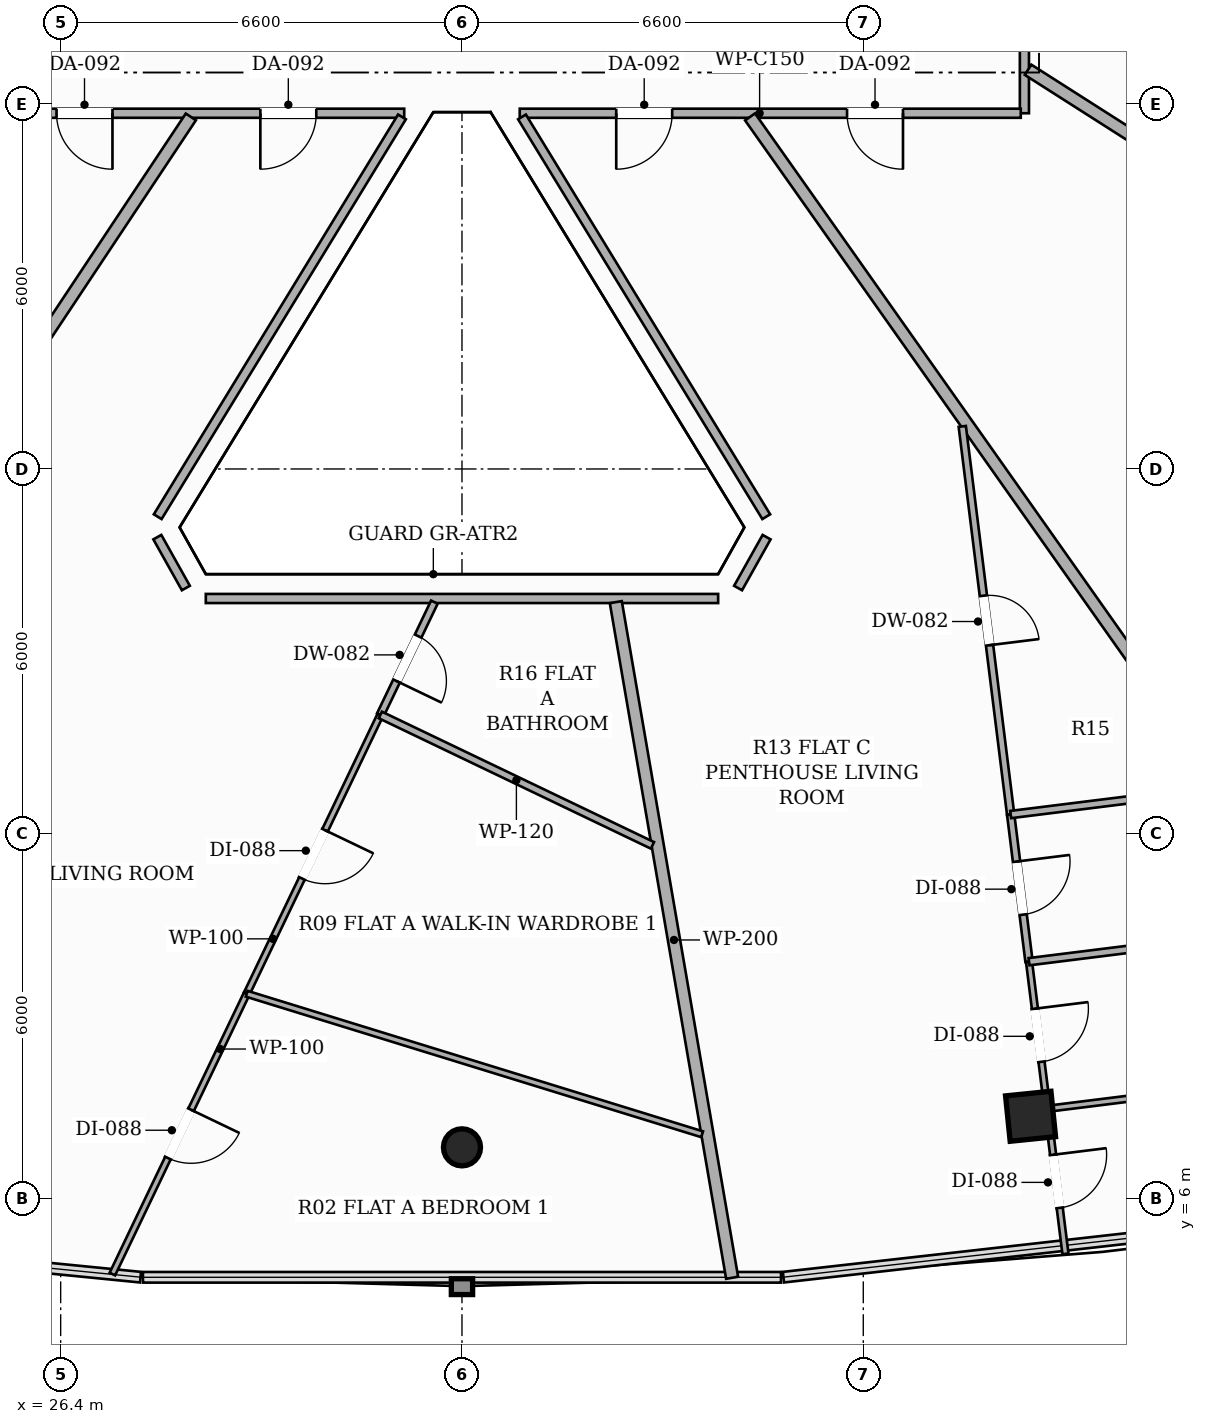
"""IFC4 building model, lengths in metres.
Left out: names, types, materials, properties, quantities, classifications, styles, units other than length and angle.
Written with IfcOpenShell. Run it as: python <this file> out.ifc"""

import sys

from ifc_helpers import new_model, si_unit, direction, frame, frame_2d, origin, origin_2d, place, context, subcontext, project, spatial, rectangle, hollow_rectangle, hollow_circle, extrude, element, fill, save


model = new_model("IFC4")
c1 = context("Model", 3, precision=1e-05, world=origin(), true_north=direction((0.0, 1.0)))
c2 = subcontext(c1, "Body", "Model", "MODEL_VIEW")
j1 = project(units=[si_unit("LENGTHUNIT", "METRE"), si_unit("PLANEANGLEUNIT", "RADIAN")], contexts=[c1])
p1 = place(None, origin())
s1 = spatial("IfcSite", under=j1, at=p1, CompositionType="ELEMENT")
p2 = place(p1, origin())
s2 = spatial("IfcBuilding", under=s1, at=p2, CompositionType="ELEMENT")
p3 = place(p2, frame((0.0, 0.0, 206.3)))
s3 = spatial("IfcBuildingStorey", under=s2, at=p3, CompositionType="ELEMENT", Elevation=206.3)
p4 = place(p3, frame((33.0, 6.844, 0.0), z_axis=(0.0, 0.0, 1.0), x_axis=(1.0, 0.0, 0.0)))
e1 = element("IfcColumn", 1, at=p4, inside=s3, PredefinedType="COLUMN", context=c2, shape_type="SweptSolid", body=[
    extrude(hollow_circle(Radius=0.305, WallThickness=0.016, at=origin_2d()), origin(), (0.0, 0.0, 1.0), 3.3),
])
p5 = place(p3, frame((42.351, 7.355, 0.0), z_axis=(0.0, 0.0, 1.0), x_axis=(0.994880708829, 0.101056297183, 0.0)))
e2 = element("IfcColumn", 2, at=p5, inside=s3, PredefinedType="COLUMN", context=c2, shape_type="SweptSolid", body=[
    extrude(hollow_rectangle(XDim=0.75, YDim=0.75, WallThickness=0.025, at=origin_2d()), origin(), (0.0, 0.0, 1.0), 3.3),
])
p6 = place(p3, frame((32.05, 23.85, 0.0), z_axis=(0.0, 0.0, 1.0), x_axis=(-1.0, 0.0, 0.0)))
e3 = element("IfcWall", 3, at=p6, inside=s3, PredefinedType="PARTITIONING", context=c2, shape_type="SweptSolid", body=[
    extrude(rectangle(XDim=8.4, YDim=0.15, at=frame_2d((4.2, 0.0))), origin(), (0.0, 0.0, 1.0), 2.565),
])
p7 = place(p6, frame((1.446, 0.0, 0.0)))
e4 = element("IfcOpeningElement", 4, at=p7, cuts=e3, PredefinedType="OPENING", context=c2, shape_type="SweptSolid", body=[
    extrude(rectangle(XDim=0.92, YDim=2.15, at=frame_2d((0.46, 1.075))), frame((0.0, 0.085, 0.0), z_axis=(0.0, -1.0, 0.0), x_axis=(1.0, 0.0, 0.0)), (0.0, 0.0, 1.0), 0.17),
])
p8 = place(p6, frame((4.798, 0.0, 0.0)))
e5 = element("IfcOpeningElement", 5, at=p8, cuts=e3, PredefinedType="OPENING", context=c2, shape_type="SweptSolid", body=[
    extrude(rectangle(XDim=0.92, YDim=2.15, at=frame_2d((0.46, 1.075))), frame((0.0, 0.085, 0.0), z_axis=(0.0, -1.0, 0.0), x_axis=(1.0, 0.0, 0.0)), (0.0, 0.0, 1.0), 0.17),
])
p9 = place(p3, frame((42.25, 26.59, 0.0), z_axis=(0.0, 0.0, 1.0), x_axis=(0.0, -1.0, 0.0)))
e6 = element("IfcWall", 6, at=p9, inside=s3, PredefinedType="PARTITIONING", context=c2, shape_type="SweptSolid", body=[
    extrude(rectangle(XDim=2.74, YDim=0.15, at=frame_2d((1.37, 0.0))), origin(), (0.0, 0.0, 1.0), 2.773),
])
p10 = place(p3, frame((42.19, 23.85, 0.0), z_axis=(0.0, 0.0, 1.0), x_axis=(-1.0, 0.0, 0.0)))
e7 = element("IfcWall", 7, at=p10, inside=s3, PredefinedType="PARTITIONING", context=c2, shape_type="SweptSolid", body=[
    extrude(rectangle(XDim=8.24, YDim=0.15, at=frame_2d((4.12, 0.0))), origin(), (0.0, 0.0, 1.0), 2.565),
])
p11 = place(p10, frame((1.937, 0.0, 0.0)))
e8 = element("IfcOpeningElement", 8, at=p11, cuts=e7, PredefinedType="OPENING", context=c2, shape_type="SweptSolid", body=[
    extrude(rectangle(XDim=0.92, YDim=2.15, at=frame_2d((0.46, 1.075))), frame((0.0, 0.085, 0.0), z_axis=(0.0, -1.0, 0.0), x_axis=(1.0, 0.0, 0.0)), (0.0, 0.0, 1.0), 0.17),
])
p12 = place(p10, frame((5.733, 0.0, 0.0)))
e9 = element("IfcOpeningElement", 9, at=p12, cuts=e7, PredefinedType="OPENING", context=c2, shape_type="SweptSolid", body=[
    extrude(rectangle(XDim=0.92, YDim=2.15, at=frame_2d((0.46, 1.075))), frame((0.0, 0.085, 0.0), z_axis=(0.0, -1.0, 0.0), x_axis=(1.0, 0.0, 0.0)), (0.0, 0.0, 1.0), 0.17),
])
p13 = place(p3, frame((33.987, 23.79, 0.0), z_axis=(0.0, 0.0, 1.0), x_axis=(0.521338496894, -0.853349970209, 0.0)))
e10 = element("IfcWall", 10, at=p13, inside=s3, PredefinedType="PARTITIONING", context=c2, shape_type="SweptSolid", body=[
    extrude(rectangle(XDim=7.705, YDim=0.15, at=frame_2d((3.853, 0.0))), origin(), (0.0, 0.0, 1.0), 2.773),
])
p14 = place(p3, frame((38.01, 16.879, 0.0), z_axis=(0.0, 0.0, 1.0), x_axis=(-0.488859069364, -0.872362774481, 0.0)))
e11 = element("IfcWall", 11, at=p14, inside=s3, PredefinedType="PARTITIONING", context=c2, shape_type="SweptSolid", body=[
    extrude(rectangle(XDim=0.959, YDim=0.15, at=frame_2d((0.48, 0.0))), origin(), (0.0, 0.0, 1.0), 3.06),
])
p15 = place(p3, frame((37.213, 15.87, 0.0), z_axis=(0.0, 0.0, 1.0), x_axis=(-1.0, 0.0, 0.0)))
e12 = element("IfcWall", 12, at=p15, inside=s3, PredefinedType="PARTITIONING", context=c2, shape_type="SweptSolid", body=[
    extrude(rectangle(XDim=8.426, YDim=0.15, at=frame_2d((4.213, 0.0))), origin(), (0.0, 0.0, 1.0), 2.773),
])
p16 = place(p3, frame((28.459, 16.042, 0.0), z_axis=(0.0, 0.0, 1.0), x_axis=(-0.488859069364, 0.872362774481, 0.0)))
e13 = element("IfcWall", 13, at=p16, inside=s3, PredefinedType="PARTITIONING", context=c2, shape_type="SweptSolid", body=[
    extrude(rectangle(XDim=0.959, YDim=0.15, at=frame_2d((0.48, 0.0))), origin(), (0.0, 0.0, 1.0), 3.06),
])
p17 = place(p3, frame((27.996, 17.215, 0.0), z_axis=(0.0, 0.0, 1.0), x_axis=(0.521338496894, 0.853349970209, 0.0)))
e14 = element("IfcWall", 14, at=p17, inside=s3, PredefinedType="PARTITIONING", context=c2, shape_type="SweptSolid", body=[
    extrude(rectangle(XDim=7.705, YDim=0.15, at=frame_2d((3.853, 0.0))), origin(), (0.0, 0.0, 1.0), 2.773),
])
p18 = place(p3, frame((35.53, 15.81, 0.0), z_axis=(0.0, 0.0, 1.0), x_axis=(0.169681394536, -0.985498972272, 0.0)))
e15 = element("IfcWall", 15, at=p18, inside=s3, PredefinedType="PARTITIONING", context=c2, shape_type="SweptSolid", body=[
    extrude(rectangle(XDim=11.275, YDim=0.2, at=frame_2d((5.637, 0.0))), origin(), (0.0, 0.0, 1.0), 2.492),
])
p19 = place(p3, frame((16.618, 5.846, 0.0), z_axis=(0.0, 0.0, 1.0), x_axis=(0.553425992232, 0.832898355817, 0.0)))
e16 = element("IfcWall", 16, at=p19, inside=s3, PredefinedType="PARTITIONING", context=c2, shape_type="SweptSolid", body=[
    extrude(rectangle(XDim=21.544, YDim=0.2, at=frame_2d((10.772, 0.0))), origin(), (0.0, 0.0, 1.0), 2.492),
])
p20 = place(p3, frame((50.316, 5.976, 0.0), z_axis=(0.0, 0.0, 1.0), x_axis=(-0.576784728977, 0.816896184603, 0.0)))
e17 = element("IfcWall", 17, at=p20, inside=s3, PredefinedType="PARTITIONING", context=c2, shape_type="SweptSolid", body=[
    extrude(rectangle(XDim=21.807, YDim=0.2, at=frame_2d((10.903, 0.0))), origin(), (0.0, 0.0, 1.0), 2.492),
])
p21 = place(p3, frame((42.31, 24.565, 0.0), z_axis=(0.0, 0.0, 1.0), x_axis=(0.843209388644, -0.537585274075, 0.0)))
e18 = element("IfcWall", 18, at=p21, inside=s3, PredefinedType="PARTITIONING", context=c2, shape_type="SweptSolid", body=[
    extrude(rectangle(XDim=12.816, YDim=0.2, at=frame_2d((6.408, 0.0))), origin(), (0.0, 0.0, 1.0), 2.492),
])
p22 = place(p3, frame((32.546, 15.81, 0.0), z_axis=(0.0, 0.0, 1.0), x_axis=(-0.43214833388, -0.90180253799, 0.0)))
e19 = element("IfcWall", 19, at=p22, inside=s3, PredefinedType="PARTITIONING", context=c2, shape_type="SweptSolid", body=[
    extrude(rectangle(XDim=2.057, YDim=0.12, at=frame_2d((1.028, 0.0))), origin(), (0.0, 0.0, 1.0), 3.06),
])
p23 = place(p22, frame((0.619, 0.0, 0.0)))
e20 = element("IfcOpeningElement", 20, at=p23, cuts=e19, PredefinedType="OPENING", context=c2, shape_type="SweptSolid", body=[
    extrude(rectangle(XDim=0.82, YDim=2.1, at=frame_2d((0.41, 1.05))), frame((0.0, 0.07, 0.0), z_axis=(0.0, -1.0, 0.0), x_axis=(1.0, 0.0, 0.0)), (0.0, 0.0, 1.0), 0.14),
])
p24 = place(p3, frame((29.459, 9.37, 0.0), z_axis=(0.0, 0.0, 1.0), x_axis=(-0.43211613455, -0.901817967364, 0.0)))
e21 = element("IfcWall", 21, at=p24, inside=s3, PredefinedType="PARTITIONING", context=c2, shape_type="SweptSolid", body=[
    extrude(rectangle(XDim=5.112, YDim=0.1, at=frame_2d((2.556, 0.0))), origin(), (0.0, 0.0, 1.0), 2.492),
])
p25 = place(p24, frame((2.116, 0.0, 0.0)))
e22 = element("IfcOpeningElement", 22, at=p25, cuts=e21, PredefinedType="OPENING", context=c2, shape_type="SweptSolid", body=[
    extrude(rectangle(XDim=0.88, YDim=2.1, at=frame_2d((0.44, 1.05))), frame((0.0, 0.06, 0.0), z_axis=(0.0, -1.0, 0.0), x_axis=(1.0, 0.0, 0.0)), (0.0, 0.0, 1.0), 0.12),
])
p26 = place(p3, frame((31.657, 13.955, 0.0), z_axis=(0.0, 0.0, 1.0), x_axis=(-0.4322861352, -0.901736489954, 0.0)))
e23 = element("IfcWall", 23, at=p26, inside=s3, PredefinedType="PARTITIONING", context=c2, shape_type="SweptSolid", body=[
    extrude(rectangle(XDim=5.084, YDim=0.1, at=frame_2d((2.542, 0.0))), origin(), (0.0, 0.0, 1.0), 3.06),
])
p27 = place(p26, frame((2.102, 0.0, 0.0)))
e24 = element("IfcOpeningElement", 24, at=p27, cuts=e23, PredefinedType="OPENING", context=c2, shape_type="SweptSolid", body=[
    extrude(rectangle(XDim=0.88, YDim=2.1, at=frame_2d((0.44, 1.05))), frame((0.0, 0.06, 0.0), z_axis=(0.0, -1.0, 0.0), x_axis=(1.0, 0.0, 0.0)), (0.0, 0.0, 1.0), 0.12),
])
p28 = place(p3, frame((36.133, 11.81, 0.0), z_axis=(0.0, 0.0, 1.0), x_axis=(-0.901797658679, 0.432158515826, 0.0)))
e25 = element("IfcWall", 25, at=p28, inside=s3, PredefinedType="PARTITIONING", context=c2, shape_type="SweptSolid", body=[
    extrude(rectangle(XDim=4.964, YDim=0.12, at=frame_2d((2.482, 0.0))), origin(), (0.0, 0.0, 1.0), 2.773),
])
p29 = place(p3, frame((29.459, 9.37, 0.0), z_axis=(0.0, 0.0, 1.0), x_axis=(0.955559226726, -0.294799193044, 0.0)))
e26 = element("IfcWall", 26, at=p29, inside=s3, PredefinedType="PARTITIONING", context=c2, shape_type="SweptSolid", body=[
    extrude(rectangle(XDim=7.839, YDim=0.1, at=frame_2d((3.92, 0.0))), origin(), (0.0, 0.0, 1.0), 2.492),
])
p30 = place(p3, frame((41.228, 18.7, 0.0), z_axis=(0.0, 0.0, 1.0), x_axis=(0.123731094195, -0.992315784581, 0.0)))
e27 = element("IfcWall", 27, at=p30, inside=s3, PredefinedType="PARTITIONING", context=c2, shape_type="SweptSolid", body=[
    extrude(rectangle(XDim=6.432, YDim=0.12, at=frame_2d((3.216, 0.0))), origin(), (0.0, 0.0, 1.0), 3.06),
])
p31 = place(p30, frame((2.806, 0.0, 0.0)))
e28 = element("IfcOpeningElement", 28, at=p31, cuts=e27, PredefinedType="OPENING", context=c2, shape_type="SweptSolid", body=[
    extrude(rectangle(XDim=0.82, YDim=2.1, at=frame_2d((0.41, 1.05))), frame((0.0, 0.07, 0.0), z_axis=(0.0, -1.0, 0.0), x_axis=(1.0, 0.0, 0.0)), (0.0, 0.0, 1.0), 0.14),
])
p32 = place(p3, frame((42.024, 12.317, 0.0), z_axis=(0.0, 0.0, 1.0), x_axis=(0.123837590029, -0.992302499894, 0.0)))
e29 = element("IfcWall", 29, at=p32, inside=s3, PredefinedType="PARTITIONING", context=c2, shape_type="SweptSolid", body=[
    extrude(rectangle(XDim=2.439, YDim=0.12, at=frame_2d((1.219, 0.0))), origin(), (0.0, 0.0, 1.0), 3.06),
])
p33 = place(p32, frame((0.779, 0.0, 0.0)))
e30 = element("IfcOpeningElement", 30, at=p33, cuts=e29, PredefinedType="OPENING", context=c2, shape_type="SweptSolid", body=[
    extrude(rectangle(XDim=0.88, YDim=2.1, at=frame_2d((0.44, 1.05))), frame((0.0, 0.07, 0.0), z_axis=(0.0, -1.0, 0.0), x_axis=(1.0, 0.0, 0.0)), (0.0, 0.0, 1.0), 0.14),
])
p34 = place(p3, frame((42.628, 7.478, 0.0), z_axis=(0.0, 0.0, 1.0), x_axis=(0.123572330504, -0.992335567806, 0.0)))
e31 = element("IfcWall", 31, at=p34, inside=s3, PredefinedType="PARTITIONING", context=c2, shape_type="SweptSolid", body=[
    extrude(rectangle(XDim=2.404, YDim=0.1, at=frame_2d((1.202, 0.0))), origin(), (0.0, 0.0, 1.0), 2.492),
])
p35 = place(p34, frame((0.762, 0.0, 0.0)))
e32 = element("IfcOpeningElement", 32, at=p35, cuts=e31, PredefinedType="OPENING", context=c2, shape_type="SweptSolid", body=[
    extrude(rectangle(XDim=0.88, YDim=2.1, at=frame_2d((0.44, 1.05))), frame((0.0, 0.06, 0.0), z_axis=(0.0, -1.0, 0.0), x_axis=(1.0, 0.0, 0.0)), (0.0, 0.0, 1.0), 0.12),
])
p36 = place(p3, frame((42.326, 9.897, 0.0), z_axis=(0.0, 0.0, 1.0), x_axis=(0.123886817851, -0.992296355109, 0.0)))
e33 = element("IfcWall", 33, at=p36, inside=s3, PredefinedType="PARTITIONING", context=c2, shape_type="SweptSolid", body=[
    extrude(rectangle(XDim=2.438, YDim=0.1, at=frame_2d((1.219, 0.0))), origin(), (0.0, 0.0, 1.0), 2.492),
])
p37 = place(p36, frame((0.779, 0.0, 0.0)))
e34 = element("IfcOpeningElement", 34, at=p37, cuts=e33, PredefinedType="OPENING", context=c2, shape_type="SweptSolid", body=[
    extrude(rectangle(XDim=0.88, YDim=2.1, at=frame_2d((0.44, 1.05))), frame((0.0, 0.06, 0.0), z_axis=(0.0, -1.0, 0.0), x_axis=(1.0, 0.0, 0.0)), (0.0, 0.0, 1.0), 0.12),
])
p38 = place(p3, frame((45.435, 12.742, 0.0), z_axis=(0.0, 0.0, 1.0), x_axis=(-0.99232587892, -0.123650111308, 0.0)))
e35 = element("IfcWall", 35, at=p38, inside=s3, PredefinedType="PARTITIONING", context=c2, shape_type="SweptSolid", body=[
    extrude(rectangle(XDim=3.438, YDim=0.12, at=frame_2d((1.719, 0.0))), origin(), (0.0, 0.0, 1.0), 2.773),
])
p39 = place(p3, frame((47.029, 10.484, 0.0), z_axis=(0.0, 0.0, 1.0), x_axis=(-0.992303215116, -0.123831858863, 0.0)))
e36 = element("IfcWall", 36, at=p39, inside=s3, PredefinedType="PARTITIONING", context=c2, shape_type="SweptSolid", body=[
    extrude(rectangle(XDim=4.74, YDim=0.12, at=frame_2d((2.37, 0.0))), origin(), (0.0, 0.0, 1.0), 2.773),
])
p40 = place(p3, frame((42.628, 7.478, 0.0), z_axis=(0.0, 0.0, 1.0), x_axis=(0.992305206969, 0.123815896488, 0.0)))
e37 = element("IfcWall", 37, at=p40, inside=s3, PredefinedType="PARTITIONING", context=c2, shape_type="SweptSolid", body=[
    extrude(rectangle(XDim=6.042, YDim=0.1, at=frame_2d((3.021, 0.0))), origin(), (0.0, 0.0, 1.0), 2.492),
])
p41 = place(p7, origin())
e38 = element("IfcDoor", 38, at=p41, inside=s3, OperationType="SINGLE_SWING_RIGHT", PredefinedType="DOOR", context=c2, shape_type="SweptSolid", body=[
    extrude(rectangle(XDim=0.92, YDim=2.15, at=frame_2d((0.46, 1.075))), frame((0.0, 0.025, 0.0), z_axis=(0.0, -1.0, 0.0), x_axis=(1.0, 0.0, 0.0)), (0.0, 0.0, 1.0), 0.05),
])
fill(e4, e38)
p42 = place(p23, origin())
e39 = element("IfcDoor", 39, at=p42, inside=s3, OperationType="SINGLE_SWING_RIGHT", PredefinedType="DOOR", context=c2, shape_type="SweptSolid", body=[
    extrude(rectangle(XDim=0.82, YDim=2.1, at=frame_2d((0.41, 1.05))), frame((0.0, 0.025, 0.0), z_axis=(0.0, -1.0, 0.0), x_axis=(1.0, 0.0, 0.0)), (0.0, 0.0, 1.0), 0.05),
])
fill(e20, e39)
p43 = place(p25, origin())
e40 = element("IfcDoor", 40, at=p43, inside=s3, OperationType="SINGLE_SWING_LEFT", PredefinedType="DOOR", context=c2, shape_type="SweptSolid", body=[
    extrude(rectangle(XDim=0.88, YDim=2.1, at=frame_2d((0.44, 1.05))), frame((0.0, 0.025, 0.0), z_axis=(0.0, -1.0, 0.0), x_axis=(1.0, 0.0, 0.0)), (0.0, 0.0, 1.0), 0.05),
])
fill(e22, e40)
p44 = place(p27, origin())
e41 = element("IfcDoor", 41, at=p44, inside=s3, OperationType="SINGLE_SWING_LEFT", PredefinedType="DOOR", context=c2, shape_type="SweptSolid", body=[
    extrude(rectangle(XDim=0.88, YDim=2.1, at=frame_2d((0.44, 1.05))), frame((0.0, 0.025, 0.0), z_axis=(0.0, -1.0, 0.0), x_axis=(1.0, 0.0, 0.0)), (0.0, 0.0, 1.0), 0.05),
])
fill(e24, e41)
p45 = place(p11, origin())
e42 = element("IfcDoor", 42, at=p45, inside=s3, OperationType="SINGLE_SWING_LEFT", PredefinedType="DOOR", context=c2, shape_type="SweptSolid", body=[
    extrude(rectangle(XDim=0.92, YDim=2.15, at=frame_2d((0.46, 1.075))), frame((0.0, 0.025, 0.0), z_axis=(0.0, -1.0, 0.0), x_axis=(1.0, 0.0, 0.0)), (0.0, 0.0, 1.0), 0.05),
])
fill(e8, e42)
p46 = place(p12, origin())
e43 = element("IfcDoor", 43, at=p46, inside=s3, OperationType="SINGLE_SWING_RIGHT", PredefinedType="DOOR", context=c2, shape_type="SweptSolid", body=[
    extrude(rectangle(XDim=0.92, YDim=2.15, at=frame_2d((0.46, 1.075))), frame((0.0, 0.025, 0.0), z_axis=(0.0, -1.0, 0.0), x_axis=(1.0, 0.0, 0.0)), (0.0, 0.0, 1.0), 0.05),
])
fill(e9, e43)
p47 = place(p31, origin())
e44 = element("IfcDoor", 44, at=p47, inside=s3, OperationType="SINGLE_SWING_RIGHT", PredefinedType="DOOR", context=c2, shape_type="SweptSolid", body=[
    extrude(rectangle(XDim=0.82, YDim=2.1, at=frame_2d((0.41, 1.05))), frame((0.0, 0.025, 0.0), z_axis=(0.0, -1.0, 0.0), x_axis=(1.0, 0.0, 0.0)), (0.0, 0.0, 1.0), 0.05),
])
fill(e28, e44)
p48 = place(p33, origin())
e45 = element("IfcDoor", 45, at=p48, inside=s3, OperationType="SINGLE_SWING_LEFT", PredefinedType="DOOR", context=c2, shape_type="SweptSolid", body=[
    extrude(rectangle(XDim=0.88, YDim=2.1, at=frame_2d((0.44, 1.05))), frame((0.0, 0.025, 0.0), z_axis=(0.0, -1.0, 0.0), x_axis=(1.0, 0.0, 0.0)), (0.0, 0.0, 1.0), 0.05),
])
fill(e30, e45)
p49 = place(p35, origin())
e46 = element("IfcDoor", 46, at=p49, inside=s3, OperationType="SINGLE_SWING_LEFT", PredefinedType="DOOR", context=c2, shape_type="SweptSolid", body=[
    extrude(rectangle(XDim=0.88, YDim=2.1, at=frame_2d((0.44, 1.05))), frame((0.0, 0.025, 0.0), z_axis=(0.0, -1.0, 0.0), x_axis=(1.0, 0.0, 0.0)), (0.0, 0.0, 1.0), 0.05),
])
fill(e32, e46)
p50 = place(p37, origin())
e47 = element("IfcDoor", 47, at=p50, inside=s3, OperationType="SINGLE_SWING_LEFT", PredefinedType="DOOR", context=c2, shape_type="SweptSolid", body=[
    extrude(rectangle(XDim=0.88, YDim=2.1, at=frame_2d((0.44, 1.05))), frame((0.0, 0.025, 0.0), z_axis=(0.0, -1.0, 0.0), x_axis=(1.0, 0.0, 0.0)), (0.0, 0.0, 1.0), 0.05),
])
fill(e34, e47)
p51 = place(p8, origin())
e48 = element("IfcDoor", 48, at=p51, inside=s3, OperationType="SINGLE_SWING_LEFT", PredefinedType="DOOR", context=c2, shape_type="SweptSolid", body=[
    extrude(rectangle(XDim=0.92, YDim=2.15, at=frame_2d((0.46, 1.075))), frame((0.0, 0.025, 0.0), z_axis=(0.0, -1.0, 0.0), x_axis=(1.0, 0.0, 0.0)), (0.0, 0.0, 1.0), 0.05),
])
fill(e5, e48)
save(model, sys.argv[1])
